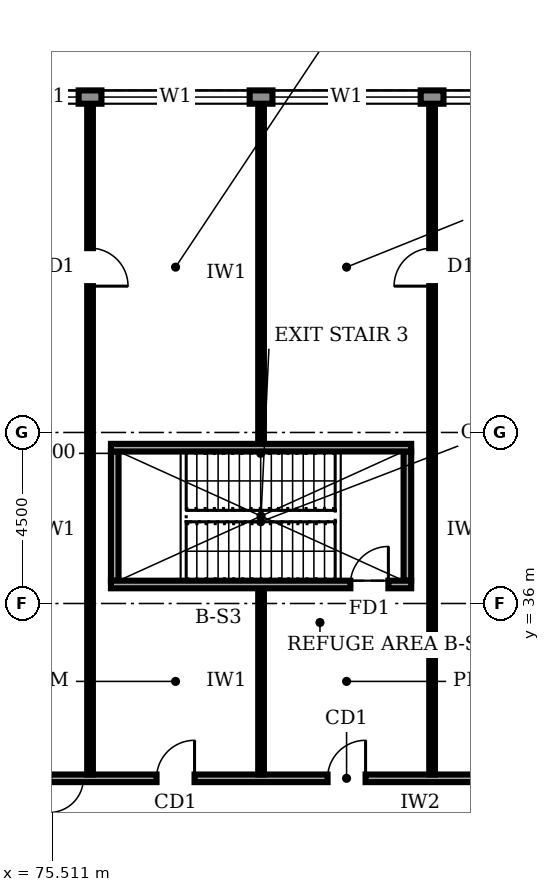
"""IFC4 building model, lengths in metres.
Left out: names, types, materials, properties, quantities, classifications, styles, units other than length and angle.
Written with IfcOpenShell. Run it as: python <this file> out.ifc"""

import sys

from ifc_helpers import new_model, si_unit, direction, frame, frame_2d, origin, place, context, subcontext, project, spatial, rectangle, extrude, element, fill, save


model = new_model("IFC4")
c1 = context("Model", 3, precision=1e-05, world=origin(), true_north=direction((0.0, 1.0)))
c2 = subcontext(c1, "Body", "Model", "MODEL_VIEW")
j1 = project(units=[si_unit("LENGTHUNIT", "METRE"), si_unit("PLANEANGLEUNIT", "RADIAN")], contexts=[c1])
p1 = place(None, origin())
s1 = spatial("IfcSite", under=j1, at=p1, CompositionType="ELEMENT")
p2 = place(p1, origin())
s2 = spatial("IfcBuilding", under=s1, at=p2, CompositionType="ELEMENT")
p3 = place(p2, frame((0.0, 0.0, 11.0)))
s3 = spatial("IfcBuildingStorey", under=s2, at=p3, CompositionType="ELEMENT", Elevation=11.0)
p4 = place(p3, frame((98.98, 49.325, 0.0), z_axis=(0.0, 0.0, 1.0), x_axis=(-1.0, 0.0, 0.0)))
e1 = element("IfcWall", 1, at=p4, inside=s3, PredefinedType="STANDARD", context=c2, shape_type="SweptSolid", body=[
    extrude(rectangle(XDim=98.96, YDim=0.35, at=frame_2d((49.48, 0.0))), origin(), (0.0, 0.0, 1.0), 4.7),
])
p5 = place(p4, frame((94.71, 0.0, 0.9)))
e2 = element("IfcOpeningElement", 2, at=p5, cuts=e1, PredefinedType="OPENING", context=c2, shape_type="SweptSolid", body=[
    extrude(rectangle(XDim=3.9, YDim=2.2, at=frame_2d((1.95, 1.1))), frame((0.0, 0.185, 0.0), z_axis=(0.0, -1.0, 0.0), x_axis=(1.0, 0.0, 0.0)), (0.0, 0.0, 1.0), 0.37),
])
p6 = place(p4, frame((90.28, 0.0, 0.9)))
e3 = element("IfcOpeningElement", 3, at=p6, cuts=e1, PredefinedType="OPENING", context=c2, shape_type="SweptSolid", body=[
    extrude(rectangle(XDim=3.9, YDim=2.2, at=frame_2d((1.95, 1.1))), frame((0.0, 0.185, 0.0), z_axis=(0.0, -1.0, 0.0), x_axis=(1.0, 0.0, 0.0)), (0.0, 0.0, 1.0), 0.37),
])
p7 = place(p4, frame((85.78, 0.0, 0.9)))
e4 = element("IfcOpeningElement", 4, at=p7, cuts=e1, PredefinedType="OPENING", context=c2, shape_type="SweptSolid", body=[
    extrude(rectangle(XDim=3.9, YDim=2.2, at=frame_2d((1.95, 1.1))), frame((0.0, 0.185, 0.0), z_axis=(0.0, -1.0, 0.0), x_axis=(1.0, 0.0, 0.0)), (0.0, 0.0, 1.0), 0.37),
])
p8 = place(p4, frame((81.28, 0.0, 0.9)))
e5 = element("IfcOpeningElement", 5, at=p8, cuts=e1, PredefinedType="OPENING", context=c2, shape_type="SweptSolid", body=[
    extrude(rectangle(XDim=3.9, YDim=2.2, at=frame_2d((1.95, 1.1))), frame((0.0, 0.185, 0.0), z_axis=(0.0, -1.0, 0.0), x_axis=(1.0, 0.0, 0.0)), (0.0, 0.0, 1.0), 0.37),
])
p9 = place(p4, frame((76.78, 0.0, 0.9)))
e6 = element("IfcOpeningElement", 6, at=p9, cuts=e1, PredefinedType="OPENING", context=c2, shape_type="SweptSolid", body=[
    extrude(rectangle(XDim=3.9, YDim=2.2, at=frame_2d((1.95, 1.1))), frame((0.0, 0.185, 0.0), z_axis=(0.0, -1.0, 0.0), x_axis=(1.0, 0.0, 0.0)), (0.0, 0.0, 1.0), 0.37),
])
p10 = place(p4, frame((72.28, 0.0, 0.9)))
e7 = element("IfcOpeningElement", 7, at=p10, cuts=e1, PredefinedType="OPENING", context=c2, shape_type="SweptSolid", body=[
    extrude(rectangle(XDim=3.9, YDim=2.2, at=frame_2d((1.95, 1.1))), frame((0.0, 0.185, 0.0), z_axis=(0.0, -1.0, 0.0), x_axis=(1.0, 0.0, 0.0)), (0.0, 0.0, 1.0), 0.37),
])
p11 = place(p4, frame((67.78, 0.0, 0.9)))
e8 = element("IfcOpeningElement", 8, at=p11, cuts=e1, PredefinedType="OPENING", context=c2, shape_type="SweptSolid", body=[
    extrude(rectangle(XDim=3.9, YDim=2.2, at=frame_2d((1.95, 1.1))), frame((0.0, 0.185, 0.0), z_axis=(0.0, -1.0, 0.0), x_axis=(1.0, 0.0, 0.0)), (0.0, 0.0, 1.0), 0.37),
])
p12 = place(p4, frame((63.28, 0.0, 0.9)))
e9 = element("IfcOpeningElement", 9, at=p12, cuts=e1, PredefinedType="OPENING", context=c2, shape_type="SweptSolid", body=[
    extrude(rectangle(XDim=3.9, YDim=2.2, at=frame_2d((1.95, 1.1))), frame((0.0, 0.185, 0.0), z_axis=(0.0, -1.0, 0.0), x_axis=(1.0, 0.0, 0.0)), (0.0, 0.0, 1.0), 0.37),
])
p13 = place(p4, frame((58.78, 0.0, 0.9)))
e10 = element("IfcOpeningElement", 10, at=p13, cuts=e1, PredefinedType="OPENING", context=c2, shape_type="SweptSolid", body=[
    extrude(rectangle(XDim=3.9, YDim=2.2, at=frame_2d((1.95, 1.1))), frame((0.0, 0.185, 0.0), z_axis=(0.0, -1.0, 0.0), x_axis=(1.0, 0.0, 0.0)), (0.0, 0.0, 1.0), 0.37),
])
p14 = place(p4, frame((54.28, 0.0, 0.9)))
e11 = element("IfcOpeningElement", 11, at=p14, cuts=e1, PredefinedType="OPENING", context=c2, shape_type="SweptSolid", body=[
    extrude(rectangle(XDim=3.9, YDim=2.2, at=frame_2d((1.95, 1.1))), frame((0.0, 0.185, 0.0), z_axis=(0.0, -1.0, 0.0), x_axis=(1.0, 0.0, 0.0)), (0.0, 0.0, 1.0), 0.37),
])
p15 = place(p4, frame((49.78, 0.0, 0.9)))
e12 = element("IfcOpeningElement", 12, at=p15, cuts=e1, PredefinedType="OPENING", context=c2, shape_type="SweptSolid", body=[
    extrude(rectangle(XDim=3.9, YDim=2.2, at=frame_2d((1.95, 1.1))), frame((0.0, 0.185, 0.0), z_axis=(0.0, -1.0, 0.0), x_axis=(1.0, 0.0, 0.0)), (0.0, 0.0, 1.0), 0.37),
])
p16 = place(p4, frame((45.28, 0.0, 0.9)))
e13 = element("IfcOpeningElement", 13, at=p16, cuts=e1, PredefinedType="OPENING", context=c2, shape_type="SweptSolid", body=[
    extrude(rectangle(XDim=3.9, YDim=2.2, at=frame_2d((1.95, 1.1))), frame((0.0, 0.185, 0.0), z_axis=(0.0, -1.0, 0.0), x_axis=(1.0, 0.0, 0.0)), (0.0, 0.0, 1.0), 0.37),
])
p17 = place(p4, frame((40.78, 0.0, 0.9)))
e14 = element("IfcOpeningElement", 14, at=p17, cuts=e1, PredefinedType="OPENING", context=c2, shape_type="SweptSolid", body=[
    extrude(rectangle(XDim=3.9, YDim=2.2, at=frame_2d((1.95, 1.1))), frame((0.0, 0.185, 0.0), z_axis=(0.0, -1.0, 0.0), x_axis=(1.0, 0.0, 0.0)), (0.0, 0.0, 1.0), 0.37),
])
p18 = place(p4, frame((36.28, 0.0, 0.9)))
e15 = element("IfcOpeningElement", 15, at=p18, cuts=e1, PredefinedType="OPENING", context=c2, shape_type="SweptSolid", body=[
    extrude(rectangle(XDim=3.9, YDim=2.2, at=frame_2d((1.95, 1.1))), frame((0.0, 0.185, 0.0), z_axis=(0.0, -1.0, 0.0), x_axis=(1.0, 0.0, 0.0)), (0.0, 0.0, 1.0), 0.37),
])
p19 = place(p4, frame((31.78, 0.0, 0.9)))
e16 = element("IfcOpeningElement", 16, at=p19, cuts=e1, PredefinedType="OPENING", context=c2, shape_type="SweptSolid", body=[
    extrude(rectangle(XDim=3.9, YDim=2.2, at=frame_2d((1.95, 1.1))), frame((0.0, 0.185, 0.0), z_axis=(0.0, -1.0, 0.0), x_axis=(1.0, 0.0, 0.0)), (0.0, 0.0, 1.0), 0.37),
])
p20 = place(p4, frame((27.28, 0.0, 0.9)))
e17 = element("IfcOpeningElement", 17, at=p20, cuts=e1, PredefinedType="OPENING", context=c2, shape_type="SweptSolid", body=[
    extrude(rectangle(XDim=3.9, YDim=2.2, at=frame_2d((1.95, 1.1))), frame((0.0, 0.185, 0.0), z_axis=(0.0, -1.0, 0.0), x_axis=(1.0, 0.0, 0.0)), (0.0, 0.0, 1.0), 0.37),
])
p21 = place(p4, frame((22.78, 0.0, 0.9)))
e18 = element("IfcOpeningElement", 18, at=p21, cuts=e1, PredefinedType="OPENING", context=c2, shape_type="SweptSolid", body=[
    extrude(rectangle(XDim=3.9, YDim=2.2, at=frame_2d((1.95, 1.1))), frame((0.0, 0.185, 0.0), z_axis=(0.0, -1.0, 0.0), x_axis=(1.0, 0.0, 0.0)), (0.0, 0.0, 1.0), 0.37),
])
p22 = place(p4, frame((18.28, 0.0, 0.9)))
e19 = element("IfcOpeningElement", 19, at=p22, cuts=e1, PredefinedType="OPENING", context=c2, shape_type="SweptSolid", body=[
    extrude(rectangle(XDim=3.9, YDim=2.2, at=frame_2d((1.95, 1.1))), frame((0.0, 0.185, 0.0), z_axis=(0.0, -1.0, 0.0), x_axis=(1.0, 0.0, 0.0)), (0.0, 0.0, 1.0), 0.37),
])
p23 = place(p4, frame((13.78, 0.0, 0.9)))
e20 = element("IfcOpeningElement", 20, at=p23, cuts=e1, PredefinedType="OPENING", context=c2, shape_type="SweptSolid", body=[
    extrude(rectangle(XDim=3.9, YDim=2.2, at=frame_2d((1.95, 1.1))), frame((0.0, 0.185, 0.0), z_axis=(0.0, -1.0, 0.0), x_axis=(1.0, 0.0, 0.0)), (0.0, 0.0, 1.0), 0.37),
])
p24 = place(p4, frame((9.28, 0.0, 0.9)))
e21 = element("IfcOpeningElement", 21, at=p24, cuts=e1, PredefinedType="OPENING", context=c2, shape_type="SweptSolid", body=[
    extrude(rectangle(XDim=3.9, YDim=2.2, at=frame_2d((1.95, 1.1))), frame((0.0, 0.185, 0.0), z_axis=(0.0, -1.0, 0.0), x_axis=(1.0, 0.0, 0.0)), (0.0, 0.0, 1.0), 0.37),
])
p25 = place(p4, frame((4.78, 0.0, 0.9)))
e22 = element("IfcOpeningElement", 22, at=p25, cuts=e1, PredefinedType="OPENING", context=c2, shape_type="SweptSolid", body=[
    extrude(rectangle(XDim=3.9, YDim=2.2, at=frame_2d((1.95, 1.1))), frame((0.0, 0.185, 0.0), z_axis=(0.0, -1.0, 0.0), x_axis=(1.0, 0.0, 0.0)), (0.0, 0.0, 1.0), 0.37),
])
p26 = place(p3, frame((89.35, 31.4, 0.0), z_axis=(0.0, 0.0, 1.0), x_axis=(-1.0, 0.0, 0.0)))
e23 = element("IfcWall", 23, at=p26, inside=s3, PredefinedType="SOLIDWALL", context=c2, shape_type="SweptSolid", body=[
    extrude(rectangle(XDim=16.9, YDim=0.2, at=frame_2d((8.45, 0.0))), origin(), (0.0, 0.0, 1.0), 4.7),
])
p27 = place(p26, frame((13.925, 0.0, 0.0)))
e24 = element("IfcOpeningElement", 24, at=p27, cuts=e23, PredefinedType="OPENING", context=c2, shape_type="SweptSolid", body=[
    extrude(rectangle(XDim=1.8, YDim=2.1, at=frame_2d((0.9, 1.05))), frame((0.0, 0.11, 0.0), z_axis=(0.0, -1.0, 0.0), x_axis=(1.0, 0.0, 0.0)), (0.0, 0.0, 1.0), 0.22),
])
p28 = place(p26, frame((10.1, 0.0, 0.0)))
e25 = element("IfcOpeningElement", 25, at=p28, cuts=e23, PredefinedType="OPENING", context=c2, shape_type="SweptSolid", body=[
    extrude(rectangle(XDim=1.0, YDim=2.1, at=frame_2d((0.5, 1.05))), frame((0.0, 0.11, 0.0), z_axis=(0.0, -1.0, 0.0), x_axis=(1.0, 0.0, 0.0)), (0.0, 0.0, 1.0), 0.22),
])
p29 = place(p26, frame((0.925, 0.0, 0.0)))
e26 = element("IfcOpeningElement", 26, at=p29, cuts=e23, PredefinedType="OPENING", context=c2, shape_type="SweptSolid", body=[
    extrude(rectangle(XDim=1.8, YDim=2.1, at=frame_2d((0.9, 1.05))), frame((0.0, 0.11, 0.0), z_axis=(0.0, -1.0, 0.0), x_axis=(1.0, 0.0, 0.0)), (0.0, 0.0, 1.0), 0.22),
])
p30 = place(p26, frame((5.6, 0.0, 0.0)))
e27 = element("IfcOpeningElement", 27, at=p30, cuts=e23, PredefinedType="OPENING", context=c2, shape_type="SweptSolid", body=[
    extrude(rectangle(XDim=1.0, YDim=2.1, at=frame_2d((0.5, 1.05))), frame((0.0, 0.11, 0.0), z_axis=(0.0, -1.0, 0.0), x_axis=(1.0, 0.0, 0.0)), (0.0, 0.0, 1.0), 0.22),
])
p31 = place(p3, frame((76.5, 31.5, 0.0), z_axis=(0.0, 0.0, 1.0), x_axis=(0.0, 1.0, 0.0)))
e28 = element("IfcWall", 28, at=p31, inside=s3, PredefinedType="PARTITIONING", context=c2, shape_type="SweptSolid", body=[
    extrude(rectangle(XDim=17.7, YDim=0.15, at=frame_2d((8.85, 0.0))), origin(), (0.0, 0.0, 1.0), 4.7),
])
p32 = place(p31, frame((12.85, 0.0, 0.0)))
e29 = element("IfcOpeningElement", 29, at=p32, cuts=e28, PredefinedType="OPENING", context=c2, shape_type="SweptSolid", body=[
    extrude(rectangle(XDim=1.0, YDim=2.1, at=frame_2d((0.5, 1.05))), frame((0.0, 0.085, 0.0), z_axis=(0.0, -1.0, 0.0), x_axis=(1.0, 0.0, 0.0)), (0.0, 0.0, 1.0), 0.17),
])
p33 = place(p3, frame((81.0, 31.5, 0.0), z_axis=(0.0, 0.0, 1.0), x_axis=(0.0, 1.0, 0.0)))
e30 = element("IfcWall", 30, at=p33, inside=s3, PredefinedType="PARTITIONING", context=c2, shape_type="SweptSolid", body=[
    extrude(rectangle(XDim=4.9, YDim=0.15, at=frame_2d((2.45, 0.0))), origin(), (0.0, 0.0, 1.0), 4.7),
])
p34 = place(p3, frame((81.0, 40.2, 0.0), z_axis=(0.0, 0.0, 1.0), x_axis=(0.0, 1.0, 0.0)))
e31 = element("IfcWall", 31, at=p34, inside=s3, PredefinedType="PARTITIONING", context=c2, shape_type="SweptSolid", body=[
    extrude(rectangle(XDim=9.0, YDim=0.15, at=frame_2d((4.5, 0.0))), origin(), (0.0, 0.0, 1.0), 4.7),
])
p35 = place(p3, frame((85.5, 31.5, 0.0), z_axis=(0.0, 0.0, 1.0), x_axis=(0.0, 1.0, 0.0)))
e32 = element("IfcWall", 32, at=p35, inside=s3, PredefinedType="PARTITIONING", context=c2, shape_type="SweptSolid", body=[
    extrude(rectangle(XDim=17.7, YDim=0.15, at=frame_2d((8.85, 0.0))), origin(), (0.0, 0.0, 1.0), 4.7),
])
p36 = place(p35, frame((12.85, 0.0, 0.0)))
e33 = element("IfcOpeningElement", 33, at=p36, cuts=e32, PredefinedType="OPENING", context=c2, shape_type="SweptSolid", body=[
    extrude(rectangle(XDim=1.0, YDim=2.1, at=frame_2d((0.5, 1.05))), frame((0.0, 0.085, 0.0), z_axis=(0.0, -1.0, 0.0), x_axis=(1.0, 0.0, 0.0)), (0.0, 0.0, 1.0), 0.17),
])
p37 = place(p3, frame((77.05, 36.5, 0.0), z_axis=(0.0, 0.0, 1.0), x_axis=(1.0, 0.0, 0.0)))
e34 = element("IfcWall", 34, at=p37, inside=s3, PredefinedType="SOLIDWALL", context=c2, shape_type="SweptSolid", body=[
    extrude(rectangle(XDim=7.9, YDim=0.2, at=frame_2d((3.95, 0.0))), origin(), (0.0, 0.0, 1.0), 4.7),
])
p38 = place(p37, frame((6.3, 0.0, 0.0)))
e35 = element("IfcOpeningElement", 35, at=p38, cuts=e34, PredefinedType="OPENING", context=c2, shape_type="SweptSolid", body=[
    extrude(rectangle(XDim=1.0, YDim=2.1, at=frame_2d((0.5, 1.05))), frame((0.0, 0.11, 0.0), z_axis=(0.0, -1.0, 0.0), x_axis=(1.0, 0.0, 0.0)), (0.0, 0.0, 1.0), 0.22),
])
p39 = place(p3, frame((77.05, 40.1, 0.0), z_axis=(0.0, 0.0, 1.0), x_axis=(1.0, 0.0, 0.0)))
e36 = element("IfcWall", 36, at=p39, inside=s3, PredefinedType="SOLIDWALL", context=c2, shape_type="SweptSolid", body=[
    extrude(rectangle(XDim=7.9, YDim=0.2, at=frame_2d((3.95, 0.0))), origin(), (0.0, 0.0, 1.0), 4.7),
])
for number, where, z_axis, x_axis in (
    (37, (77.15, 36.6, 0.0), (0.0, 0.0, 1.0), (0.0, 1.0, 0.0)),
    (38, (84.85, 36.6, 0.0), (0.0, 0.0, 1.0), (0.0, 1.0, 0.0)),
):
    element("IfcWall", number, at=place(p3, frame(where, z_axis=z_axis, x_axis=x_axis)), inside=s3, PredefinedType="SOLIDWALL", context=c2, shape_type="SweptSolid", body=[
        extrude(rectangle(XDim=3.4, YDim=0.2, at=frame_2d((1.7, 0.0))), origin(), (0.0, 0.0, 1.0), 4.7),
    ])
p40 = place(p21, origin())
e39 = element("IfcWindow", 39, at=p40, inside=s3, PartitioningType="SINGLE_PANEL", PredefinedType="WINDOW", context=c2, shape_type="SweptSolid", body=[
    extrude(rectangle(XDim=3.9, YDim=2.2, at=frame_2d((1.95, 1.1))), frame((0.0, 0.03, 0.0), z_axis=(0.0, -1.0, 0.0), x_axis=(1.0, 0.0, 0.0)), (0.0, 0.0, 1.0), 0.06),
])
fill(e18, e39)
p41 = place(p22, origin())
e40 = element("IfcWindow", 40, at=p41, inside=s3, PartitioningType="SINGLE_PANEL", PredefinedType="WINDOW", context=c2, shape_type="SweptSolid", body=[
    extrude(rectangle(XDim=3.9, YDim=2.2, at=frame_2d((1.95, 1.1))), frame((0.0, 0.03, 0.0), z_axis=(0.0, -1.0, 0.0), x_axis=(1.0, 0.0, 0.0)), (0.0, 0.0, 1.0), 0.06),
])
fill(e19, e40)
p42 = place(p23, origin())
e41 = element("IfcWindow", 41, at=p42, inside=s3, PartitioningType="SINGLE_PANEL", PredefinedType="WINDOW", context=c2, shape_type="SweptSolid", body=[
    extrude(rectangle(XDim=3.9, YDim=2.2, at=frame_2d((1.95, 1.1))), frame((0.0, 0.03, 0.0), z_axis=(0.0, -1.0, 0.0), x_axis=(1.0, 0.0, 0.0)), (0.0, 0.0, 1.0), 0.06),
])
fill(e20, e41)
p43 = place(p24, origin())
e42 = element("IfcWindow", 42, at=p43, inside=s3, PartitioningType="SINGLE_PANEL", PredefinedType="WINDOW", context=c2, shape_type="SweptSolid", body=[
    extrude(rectangle(XDim=3.9, YDim=2.2, at=frame_2d((1.95, 1.1))), frame((0.0, 0.03, 0.0), z_axis=(0.0, -1.0, 0.0), x_axis=(1.0, 0.0, 0.0)), (0.0, 0.0, 1.0), 0.06),
])
fill(e21, e42)
p44 = place(p28, frame((1.0, 0.0, 0.0), z_axis=(0.0, 0.0, 1.0), x_axis=(-1.0, 0.0, 0.0)))
e43 = element("IfcDoor", 43, at=p44, inside=s3, OperationType="SINGLE_SWING_RIGHT", PredefinedType="DOOR", context=c2, shape_type="SweptSolid", body=[
    extrude(rectangle(XDim=1.0, YDim=2.1, at=frame_2d((0.5, 1.05))), frame((0.0, 0.025, 0.0), z_axis=(0.0, -1.0, 0.0), x_axis=(1.0, 0.0, 0.0)), (0.0, 0.0, 1.0), 0.05),
])
fill(e25, e43)
p45 = place(p30, frame((1.0, 0.0, 0.0), z_axis=(0.0, 0.0, 1.0), x_axis=(-1.0, 0.0, 0.0)))
e44 = element("IfcDoor", 44, at=p45, inside=s3, OperationType="SINGLE_SWING_RIGHT", PredefinedType="DOOR", context=c2, shape_type="SweptSolid", body=[
    extrude(rectangle(XDim=1.0, YDim=2.1, at=frame_2d((0.5, 1.05))), frame((0.0, 0.025, 0.0), z_axis=(0.0, -1.0, 0.0), x_axis=(1.0, 0.0, 0.0)), (0.0, 0.0, 1.0), 0.05),
])
fill(e27, e44)
p46 = place(p32, frame((1.0, 0.0, 0.0), z_axis=(0.0, 0.0, 1.0), x_axis=(-1.0, 0.0, 0.0)))
e45 = element("IfcDoor", 45, at=p46, inside=s3, OperationType="SINGLE_SWING_RIGHT", PredefinedType="DOOR", context=c2, shape_type="SweptSolid", body=[
    extrude(rectangle(XDim=1.0, YDim=2.1, at=frame_2d((0.5, 1.05))), frame((0.0, 0.025, 0.0), z_axis=(0.0, -1.0, 0.0), x_axis=(1.0, 0.0, 0.0)), (0.0, 0.0, 1.0), 0.05),
])
fill(e29, e45)
p47 = place(p36, origin())
e46 = element("IfcDoor", 46, at=p47, inside=s3, OperationType="SINGLE_SWING_LEFT", PredefinedType="DOOR", context=c2, shape_type="SweptSolid", body=[
    extrude(rectangle(XDim=1.0, YDim=2.1, at=frame_2d((0.5, 1.05))), frame((0.0, 0.025, 0.0), z_axis=(0.0, -1.0, 0.0), x_axis=(1.0, 0.0, 0.0)), (0.0, 0.0, 1.0), 0.05),
])
fill(e33, e46)
p48 = place(p38, origin())
e47 = element("IfcDoor", 47, at=p48, inside=s3, OperationType="SINGLE_SWING_RIGHT", PredefinedType="DOOR", context=c2, shape_type="SweptSolid", body=[
    extrude(rectangle(XDim=1.0, YDim=2.1, at=frame_2d((0.5, 1.05))), frame((0.0, 0.025, 0.0), z_axis=(0.0, -1.0, 0.0), x_axis=(1.0, 0.0, 0.0)), (0.0, 0.0, 1.0), 0.05),
])
fill(e35, e47)
save(model, sys.argv[1])
